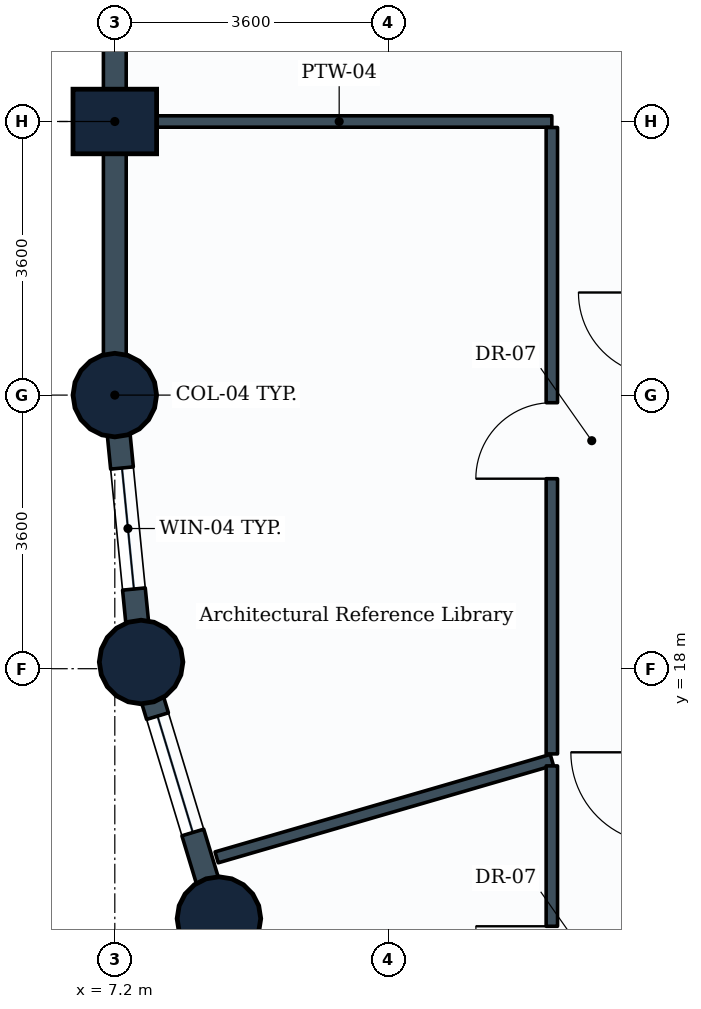
"""IFC4 building model, lengths in metres.
Left out: names, types, materials, properties, quantities, classifications, styles, units other than length and angle.
Written with IfcOpenShell. Run it as: python <this file> out.ifc"""

import sys

from ifc_helpers import new_model, si_unit, direction, frame, frame_2d, origin, origin_2d, place, context, subcontext, project, spatial, rectangle, circle, extrude, element, fill, save


model = new_model("IFC4")
c1 = context("Model", 3, precision=1e-05, world=origin(), true_north=direction((0.0, 1.0)))
c2 = subcontext(c1, "Body", "Model", "MODEL_VIEW")
j1 = project(units=[si_unit("LENGTHUNIT", "METRE"), si_unit("PLANEANGLEUNIT", "RADIAN")], contexts=[c1])
p1 = place(None, origin())
s1 = spatial("IfcSite", under=j1, at=p1, CompositionType="ELEMENT")
p2 = place(p1, origin())
s2 = spatial("IfcBuilding", under=s1, at=p2, CompositionType="ELEMENT")
p3 = place(p2, frame((0.0, 0.0, 84.0)))
s3 = spatial("IfcBuildingStorey", under=s2, at=p3, CompositionType="ELEMENT", Elevation=84.0)
p4 = place(p3, frame((7.2, 21.6, 0.0), z_axis=(0.0, 0.0, 1.0), x_axis=(1.0, 0.0, 0.0)))
e1 = element("IfcColumn", 1, at=p4, inside=s3, PredefinedType="COLUMN", context=c2, shape_type="SweptSolid", body=[
    extrude(circle(Radius=0.55, at=origin_2d()), origin(), (0.0, 0.0, 1.0), 3.9),
])
p5 = place(p3, frame((7.2, 25.2, 0.0), z_axis=(0.0, 0.0, 1.0), x_axis=(0.0, 1.0, 0.0)))
e2 = element("IfcColumn", 2, at=p5, inside=s3, PredefinedType="COLUMN", context=c2, shape_type="SweptSolid", body=[
    extrude(rectangle(XDim=0.85, YDim=1.1, at=origin_2d()), origin(), (0.0, 0.0, 1.0), 3.9),
])
for number, where, z_axis, x_axis in (
    (3, (7.546, 18.088, 0.0), (0.0, 0.0, 1.0), (1.0, 0.0, 0.0)),
    (4, (8.57, 14.712, 0.0), (0.0, 0.0, 1.0), (1.0, 0.0, 0.0)),
):
    element("IfcColumn", number, at=place(p3, frame(where, z_axis=z_axis, x_axis=x_axis)), inside=s3, PredefinedType="COLUMN", context=c2, shape_type="SweptSolid", body=[
        extrude(circle(Radius=0.55, at=origin_2d()), origin(), (0.0, 0.0, 1.0), 3.9),
    ])
p6 = place(p3, frame((7.2, 25.2, 0.0), z_axis=(0.0, 0.0, 1.0), x_axis=(0.0, 1.0, 0.0)))
e5 = element("IfcWall", 5, at=p6, inside=s3, PredefinedType="STANDARD", context=c2, shape_type="SweptSolid", body=[
    extrude(rectangle(XDim=3.6, YDim=0.3, at=frame_2d((1.8, 0.0))), origin(), (0.0, 0.0, 1.0), 2.93),
])
p7 = place(p3, frame((7.2, 21.6, 0.0), z_axis=(0.0, 0.0, 1.0), x_axis=(0.0, 1.0, 0.0)))
e6 = element("IfcWall", 6, at=p7, inside=s3, PredefinedType="STANDARD", context=c2, shape_type="SweptSolid", body=[
    extrude(rectangle(XDim=3.6, YDim=0.3, at=frame_2d((1.8, 0.0))), origin(), (0.0, 0.0, 1.0), 2.93),
])
p8 = place(p3, frame((7.546, 18.088, 0.0), z_axis=(0.0, 0.0, 1.0), x_axis=(-0.09802417461, 0.995184033831, 0.0)))
e7 = element("IfcWall", 7, at=p8, inside=s3, PredefinedType="STANDARD", context=c2, shape_type="SweptSolid", body=[
    extrude(rectangle(XDim=3.529, YDim=0.3, at=frame_2d((1.765, 0.0))), origin(), (0.0, 0.0, 1.0), 2.93),
])
p9 = place(p8, frame((0.965, 0.0, 0.85)))
e8 = element("IfcOpeningElement", 8, at=p9, cuts=e7, PredefinedType="OPENING", context=c2, shape_type="SweptSolid", body=[
    extrude(rectangle(XDim=1.6, YDim=1.35, at=frame_2d((0.8, 0.675))), frame((0.0, 0.16, 0.0), z_axis=(0.0, -1.0, 0.0), x_axis=(1.0, 0.0, 0.0)), (0.0, 0.0, 1.0), 0.32),
])
p10 = place(p3, frame((8.57, 14.712, 0.0), z_axis=(0.0, 0.0, 1.0), x_axis=(-0.290305086481, 0.956934144423, 0.0)))
e9 = element("IfcWall", 9, at=p10, inside=s3, PredefinedType="STANDARD", context=c2, shape_type="SweptSolid", body=[
    extrude(rectangle(XDim=3.528, YDim=0.3, at=frame_2d((1.764, 0.0))), origin(), (0.0, 0.0, 1.0), 2.93),
])
p11 = place(p10, frame((1.184, 0.0, 0.85)))
e10 = element("IfcOpeningElement", 10, at=p11, cuts=e9, PredefinedType="OPENING", context=c2, shape_type="SweptSolid", body=[
    extrude(rectangle(XDim=1.6, YDim=1.35, at=frame_2d((0.8, 0.675))), frame((0.0, 0.16, 0.0), z_axis=(0.0, -1.0, 0.0), x_axis=(1.0, 0.0, 0.0)), (0.0, 0.0, 1.0), 0.32),
])
p12 = place(p3, frame((10.234, 11.6, 0.0), z_axis=(0.0, 0.0, 1.0), x_axis=(-0.47151087309, 0.881860247748, 0.0)))
e11 = element("IfcWall", 11, at=p12, inside=s3, PredefinedType="STANDARD", context=c2, shape_type="SweptSolid", body=[
    extrude(rectangle(XDim=3.529, YDim=0.3, at=frame_2d((1.764, 0.0))), origin(), (0.0, 0.0, 1.0), 2.93),
])
p13 = place(p12, frame((0.964, 0.0, 0.85)))
e12 = element("IfcOpeningElement", 12, at=p13, cuts=e11, PredefinedType="OPENING", context=c2, shape_type="SweptSolid", body=[
    extrude(rectangle(XDim=1.6, YDim=1.35, at=frame_2d((0.8, 0.675))), frame((0.0, 0.16, 0.0), z_axis=(0.0, -1.0, 0.0), x_axis=(1.0, 0.0, 0.0)), (0.0, 0.0, 1.0), 0.32),
])
p14 = place(p3, frame((7.354, 25.2, 0.0), z_axis=(0.0, 0.0, 1.0), x_axis=(1.0, 0.0, 0.0)))
e13 = element("IfcWall", 13, at=p14, inside=s3, PredefinedType="PARTITIONING", context=c2, shape_type="SweptSolid", body=[
    extrude(rectangle(XDim=5.596, YDim=0.15, at=frame_2d((2.798, 0.0))), origin(), (0.0, 0.0, 1.0), 3.635),
])
p15 = place(p3, frame((12.95, 16.8, 0.0), z_axis=(0.0, 0.0, 1.0), x_axis=(-0.960237798553, -0.279183398915, 0.0)))
e14 = element("IfcWall", 14, at=p15, inside=s3, PredefinedType="PARTITIONING", context=c2, shape_type="SweptSolid", body=[
    extrude(rectangle(XDim=4.593, YDim=0.15, at=frame_2d((2.296, 0.0))), origin(), (0.0, 0.0, 1.0), 2.93),
])
p16 = place(p3, frame((12.95, 16.879, 0.0), z_axis=(0.0, 0.0, 1.0), x_axis=(0.0, 1.0, 0.0)))
e15 = element("IfcWall", 15, at=p16, inside=s3, PredefinedType="PARTITIONING", context=c2, shape_type="SweptSolid", body=[
    extrude(rectangle(XDim=8.242, YDim=0.15, at=frame_2d((4.121, 0.0))), origin(), (0.0, 0.0, 1.0), 3.19),
])
p17 = place(p16, frame((3.621, 0.0, 0.0)))
e16 = element("IfcOpeningElement", 16, at=p17, cuts=e15, PredefinedType="OPENING", context=c2, shape_type="SweptSolid", body=[
    extrude(rectangle(XDim=1.0, YDim=2.1, at=frame_2d((0.5, 1.05))), frame((0.0, 0.085, 0.0), z_axis=(0.0, -1.0, 0.0), x_axis=(1.0, 0.0, 0.0)), (0.0, 0.0, 1.0), 0.17),
])
p18 = place(p3, frame((12.95, 8.634, 0.0), z_axis=(0.0, 0.0, 1.0), x_axis=(0.0, 1.0, 0.0)))
e17 = element("IfcWall", 17, at=p18, inside=s3, PredefinedType="PARTITIONING", context=c2, shape_type="SweptSolid", body=[
    extrude(rectangle(XDim=8.087, YDim=0.15, at=frame_2d((4.043, 0.0))), origin(), (0.0, 0.0, 1.0), 2.93),
])
p19 = place(p18, frame((4.977, 0.0, 0.0)))
e18 = element("IfcOpeningElement", 18, at=p19, cuts=e17, PredefinedType="OPENING", context=c2, shape_type="SweptSolid", body=[
    extrude(rectangle(XDim=1.0, YDim=2.1, at=frame_2d((0.5, 1.05))), frame((0.0, 0.085, 0.0), z_axis=(0.0, -1.0, 0.0), x_axis=(1.0, 0.0, 0.0)), (0.0, 0.0, 1.0), 0.17),
])
p20 = place(p9, origin())
e19 = element("IfcWindow", 19, at=p20, inside=s3, PartitioningType="SINGLE_PANEL", PredefinedType="WINDOW", context=c2, shape_type="SweptSolid", body=[
    extrude(rectangle(XDim=1.6, YDim=1.35, at=frame_2d((0.8, 0.675))), frame((0.0, 0.03, 0.0), z_axis=(0.0, -1.0, 0.0), x_axis=(1.0, 0.0, 0.0)), (0.0, 0.0, 1.0), 0.06),
])
fill(e8, e19)
p21 = place(p11, origin())
e20 = element("IfcWindow", 20, at=p21, inside=s3, PartitioningType="SINGLE_PANEL", PredefinedType="WINDOW", context=c2, shape_type="SweptSolid", body=[
    extrude(rectangle(XDim=1.6, YDim=1.35, at=frame_2d((0.8, 0.675))), frame((0.0, 0.03, 0.0), z_axis=(0.0, -1.0, 0.0), x_axis=(1.0, 0.0, 0.0)), (0.0, 0.0, 1.0), 0.06),
])
fill(e10, e20)
p22 = place(p17, origin())
e21 = element("IfcDoor", 21, at=p22, inside=s3, OperationType="SINGLE_SWING_LEFT", PredefinedType="DOOR", context=c2, shape_type="SweptSolid", body=[
    extrude(rectangle(XDim=1.0, YDim=2.1, at=frame_2d((0.5, 1.05))), frame((0.0, 0.025, 0.0), z_axis=(0.0, -1.0, 0.0), x_axis=(1.0, 0.0, 0.0)), (0.0, 0.0, 1.0), 0.05),
])
fill(e16, e21)
p23 = place(p19, origin())
e22 = element("IfcDoor", 22, at=p23, inside=s3, OperationType="SINGLE_SWING_RIGHT", PredefinedType="DOOR", context=c2, shape_type="SweptSolid", body=[
    extrude(rectangle(XDim=1.0, YDim=2.1, at=frame_2d((0.5, 1.05))), frame((0.0, 0.025, 0.0), z_axis=(0.0, -1.0, 0.0), x_axis=(1.0, 0.0, 0.0)), (0.0, 0.0, 1.0), 0.05),
])
fill(e18, e22)
save(model, sys.argv[1])
